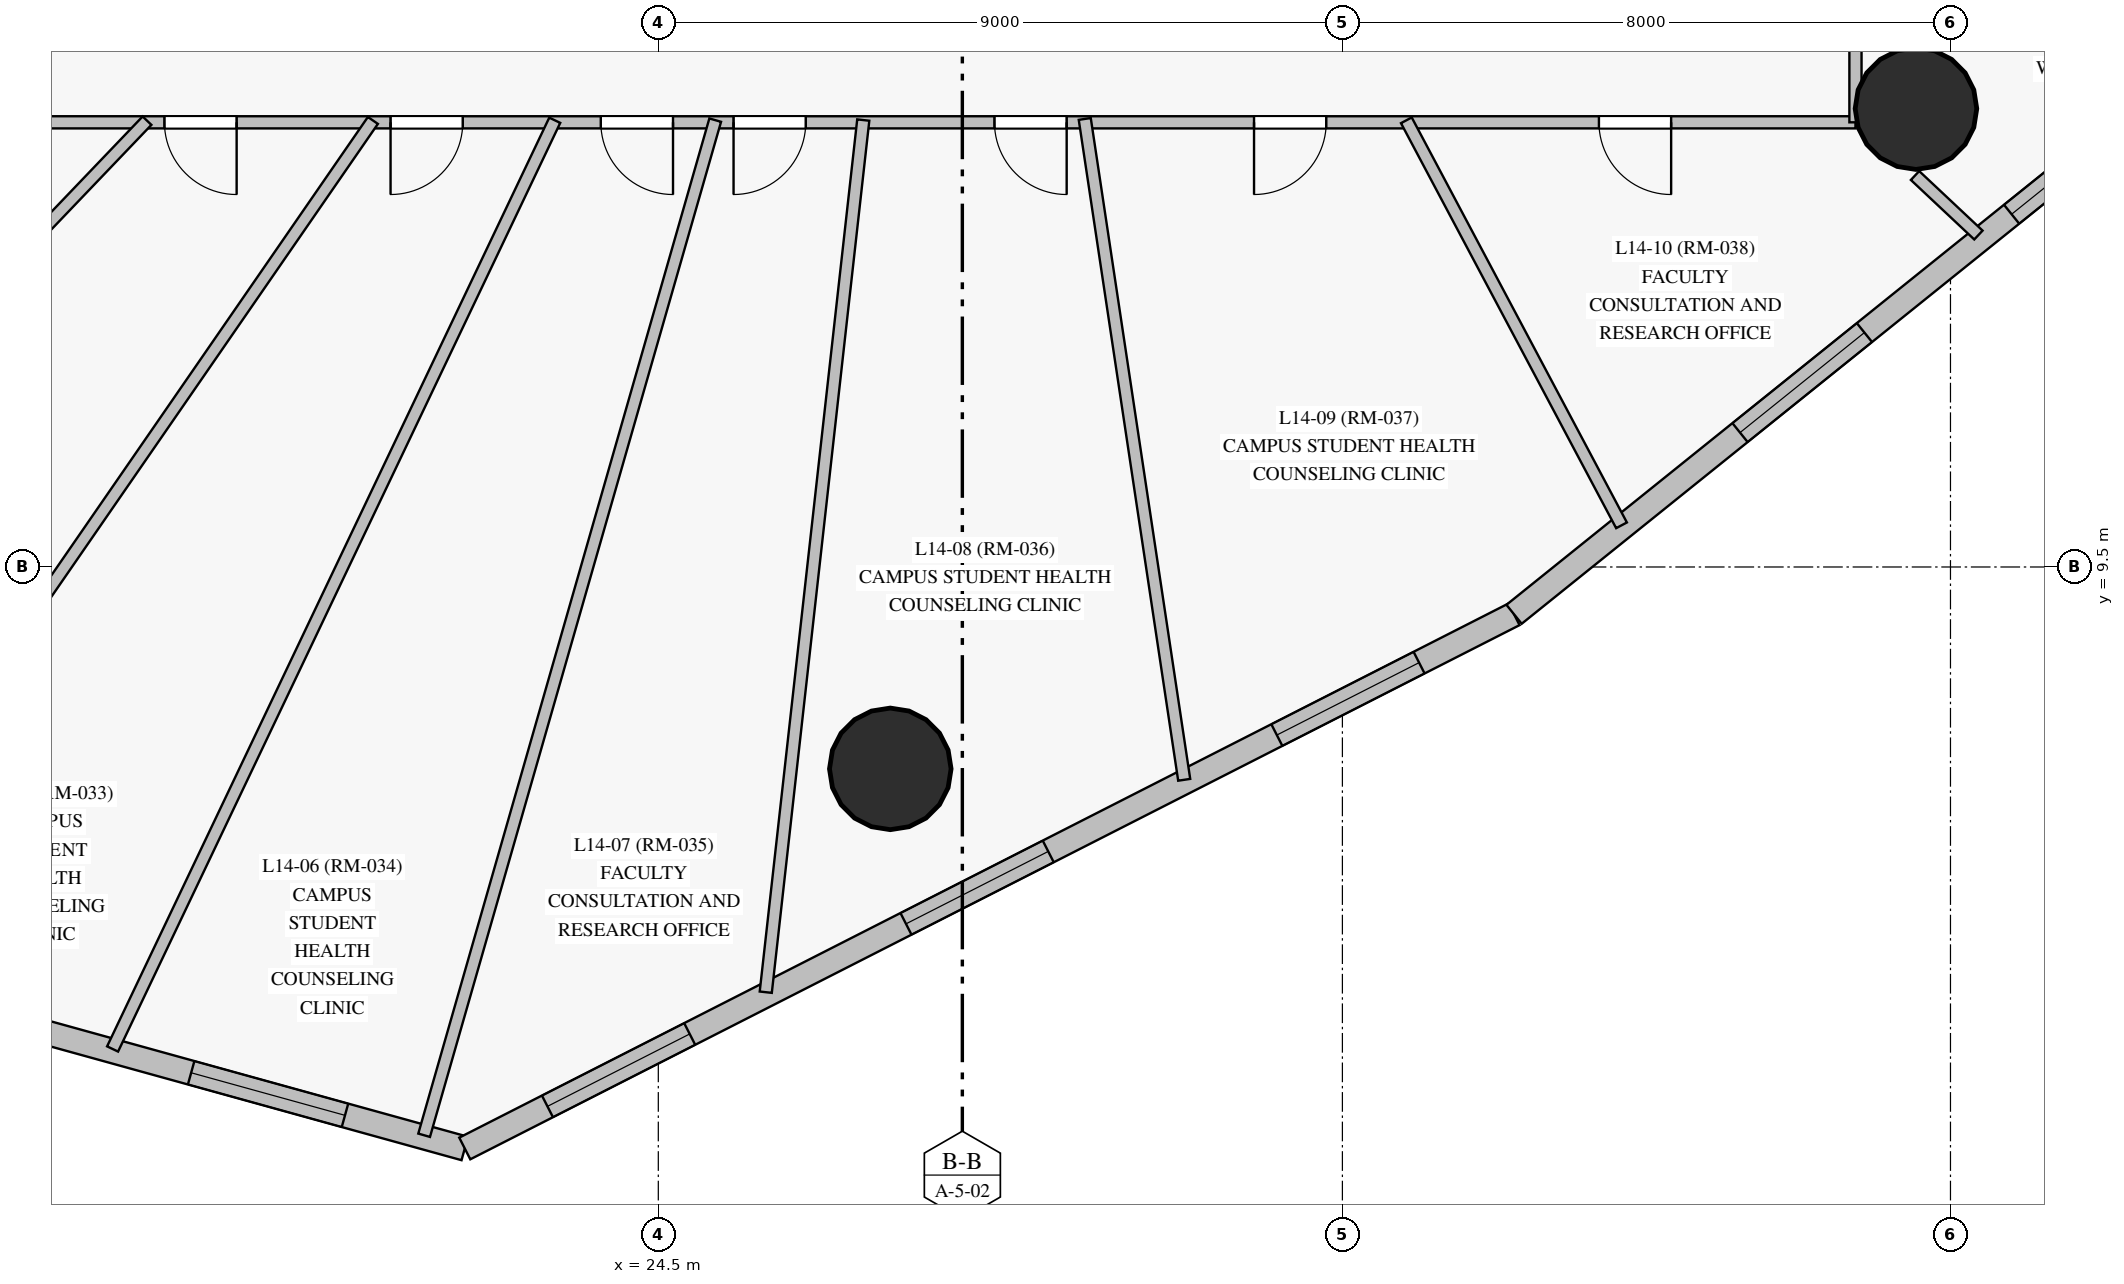
"""IFC4 building model, lengths in metres.
Left out: names, types, materials, properties, quantities, classifications, styles, units other than length and angle.
Written with IfcOpenShell. Run it as: python <this file> out.ifc"""

import sys

from ifc_helpers import new_model, si_unit, direction, frame, frame_2d, origin, origin_with_axes, origin_2d, place, context, subcontext, project, spatial, rectangle, circle, extrude, source, transform, mapped, element, fill, save


model = new_model("IFC4")
c1 = context("Model", 3, precision=1e-05, world=origin(), true_north=direction((0.0, 1.0)))
c2 = subcontext(c1, "Body", "Model", "MODEL_VIEW")
j1 = project(units=[si_unit("LENGTHUNIT", "METRE"), si_unit("PLANEANGLEUNIT", "RADIAN")], contexts=[c1])
p1 = place(None, origin())
s1 = spatial("IfcSite", under=j1, at=p1, CompositionType="ELEMENT")
p2 = place(p1, origin())
s2 = spatial("IfcBuilding", under=s1, at=p2, CompositionType="ELEMENT")
p3 = place(p2, frame((0.0, 0.0, 55.3)))
s3 = spatial("IfcBuildingStorey", under=s2, at=p3, CompositionType="ELEMENT", Elevation=55.3)
m1 = source(origin_with_axes(), c2, "Body", "SweptSolid", [
    extrude(circle(Radius=0.8, at=origin_2d()), origin(), (0.0, 0.0, 1.0), 3.6),
])
for number, where, z_axis, x_axis in (
    (1, (27.552, 6.844, 0.0), (0.0, 0.0, 1.0), (1.0, 0.0, 0.0)),
    (2, (41.046, 15.53, 0.0), (0.0, 0.0, 1.0), (1.0, 0.0, 0.0)),
):
    element("IfcColumn", number, at=place(p3, frame(where, z_axis=z_axis, x_axis=x_axis)), inside=s3, PredefinedType="COLUMN", context=c2, shape_type="MappedRepresentation", body=[
        mapped(m1, transform((0.0, 0.0, 0.0), scale=1.0)),
    ])
p4 = place(p3, frame((12.0, 4.604, 0.0), z_axis=(0.0, 0.0, 1.0), x_axis=(0.963790700111, -0.266659870207, 0.0)))
e3 = element("IfcWall", 3, at=p4, inside=s3, PredefinedType="SOLIDWALL", context=c2, shape_type="SweptSolid", body=[
    extrude(rectangle(XDim=10.328, YDim=0.32, at=frame_2d((5.164, 0.0))), origin(), (0.0, 0.0, 1.0), 3.35),
])
p5 = place(p4, frame((2.29, 0.0, 0.85)))
e4 = element("IfcOpeningElement", 4, at=p5, cuts=e3, PredefinedType="OPENING", context=c2, shape_type="SweptSolid", body=[
    extrude(rectangle(XDim=2.1, YDim=1.95, at=frame_2d((1.05, 0.975))), frame((0.0, 0.17, 0.0), z_axis=(0.0, -1.0, 0.0), x_axis=(1.0, 0.0, 0.0)), (0.0, 0.0, 1.0), 0.34),
])
p6 = place(p4, frame((6.593, 0.0, 0.85)))
e5 = element("IfcOpeningElement", 5, at=p6, cuts=e3, PredefinedType="OPENING", context=c2, shape_type="SweptSolid", body=[
    extrude(rectangle(XDim=2.1, YDim=1.95, at=frame_2d((1.05, 0.975))), frame((0.0, 0.17, 0.0), z_axis=(0.0, -1.0, 0.0), x_axis=(1.0, 0.0, 0.0)), (0.0, 0.0, 1.0), 0.34),
])
p7 = place(p3, frame((21.954, 1.85, 0.0), z_axis=(0.0, 0.0, 1.0), x_axis=(0.891166475467, 0.453676440874, 0.0)))
e6 = element("IfcWall", 6, at=p7, inside=s3, PredefinedType="SOLIDWALL", context=c2, shape_type="SweptSolid", body=[
    extrude(rectangle(XDim=15.49, YDim=0.32, at=frame_2d((7.745, 0.0))), origin(), (0.0, 0.0, 1.0), 3.35),
])
p8 = place(p7, frame((1.22, 0.0, 0.85)))
e7 = element("IfcOpeningElement", 7, at=p8, cuts=e6, PredefinedType="OPENING", context=c2, shape_type="SweptSolid", body=[
    extrude(rectangle(XDim=2.1, YDim=1.95, at=frame_2d((1.05, 0.975))), frame((0.0, 0.17, 0.0), z_axis=(0.0, -1.0, 0.0), x_axis=(1.0, 0.0, 0.0)), (0.0, 0.0, 1.0), 0.34),
])
p9 = place(p7, frame((6.514, 0.0, 0.85)))
e8 = element("IfcOpeningElement", 8, at=p9, cuts=e6, PredefinedType="OPENING", context=c2, shape_type="SweptSolid", body=[
    extrude(rectangle(XDim=2.1, YDim=1.95, at=frame_2d((1.05, 0.975))), frame((0.0, 0.17, 0.0), z_axis=(0.0, -1.0, 0.0), x_axis=(1.0, 0.0, 0.0)), (0.0, 0.0, 1.0), 0.34),
])
p10 = place(p7, frame((11.988, 0.0, 0.85)))
e9 = element("IfcOpeningElement", 9, at=p10, cuts=e6, PredefinedType="OPENING", context=c2, shape_type="SweptSolid", body=[
    extrude(rectangle(XDim=2.1, YDim=1.95, at=frame_2d((1.05, 0.975))), frame((0.0, 0.17, 0.0), z_axis=(0.0, -1.0, 0.0), x_axis=(1.0, 0.0, 0.0)), (0.0, 0.0, 1.0), 0.34),
])
p11 = place(p3, frame((35.758, 8.878, 0.0), z_axis=(0.0, 0.0, 1.0), x_axis=(0.779333999584, 0.62660874323, 0.0)))
e10 = element("IfcWall", 10, at=p11, inside=s3, PredefinedType="SOLIDWALL", context=c2, shape_type="SweptSolid", body=[
    extrude(rectangle(XDim=10.771, YDim=0.32, at=frame_2d((5.385, 0.0))), origin(), (0.0, 0.0, 1.0), 3.35),
])
p12 = place(p11, frame((3.815, 0.0, 0.85)))
e11 = element("IfcOpeningElement", 11, at=p12, cuts=e10, PredefinedType="OPENING", context=c2, shape_type="SweptSolid", body=[
    extrude(rectangle(XDim=2.1, YDim=1.95, at=frame_2d((1.05, 0.975))), frame((0.0, 0.17, 0.0), z_axis=(0.0, -1.0, 0.0), x_axis=(1.0, 0.0, 0.0)), (0.0, 0.0, 1.0), 0.34),
])
p13 = place(p11, frame((8.399, 0.0, 0.85)))
e12 = element("IfcOpeningElement", 12, at=p13, cuts=e10, PredefinedType="OPENING", context=c2, shape_type="SweptSolid", body=[
    extrude(rectangle(XDim=1.8, YDim=1.85, at=frame_2d((0.9, 0.925))), frame((0.0, 0.17, 0.0), z_axis=(0.0, -1.0, 0.0), x_axis=(1.0, 0.0, 0.0)), (0.0, 0.0, 1.0), 0.34),
])
p14 = place(p3, frame((40.25, 15.35, 0.0), z_axis=(0.0, 0.0, 1.0), x_axis=(-1.0, 0.0, 0.0)))
e13 = element("IfcWall", 13, at=p14, inside=s3, PredefinedType="PARTITIONING", context=c2, shape_type="SweptSolid", body=[
    extrude(rectangle(XDim=29.75, YDim=0.16, at=frame_2d((14.875, 0.0))), origin(), (0.0, 0.0, 1.0), 2.7),
])
p15 = place(p14, frame((24.112, 0.0, 0.0)))
e14 = element("IfcOpeningElement", 14, at=p15, cuts=e13, PredefinedType="OPENING", context=c2, shape_type="SweptSolid", body=[
    extrude(rectangle(XDim=0.95, YDim=2.15, at=frame_2d((0.475, 1.075))), frame((0.0, 0.09, 0.0), z_axis=(0.0, -1.0, 0.0), x_axis=(1.0, 0.0, 0.0)), (0.0, 0.0, 1.0), 0.18),
])
p16 = place(p14, frame((21.298, 0.0, 0.0)))
e15 = element("IfcOpeningElement", 15, at=p16, cuts=e13, PredefinedType="OPENING", context=c2, shape_type="SweptSolid", body=[
    extrude(rectangle(XDim=0.95, YDim=2.15, at=frame_2d((0.475, 1.075))), frame((0.0, 0.09, 0.0), z_axis=(0.0, -1.0, 0.0), x_axis=(1.0, 0.0, 0.0)), (0.0, 0.0, 1.0), 0.18),
])
p17 = place(p14, frame((18.323, 0.0, 0.0)))
e16 = element("IfcOpeningElement", 16, at=p17, cuts=e13, PredefinedType="OPENING", context=c2, shape_type="SweptSolid", body=[
    extrude(rectangle(XDim=0.95, YDim=2.15, at=frame_2d((0.475, 1.075))), frame((0.0, 0.09, 0.0), z_axis=(0.0, -1.0, 0.0), x_axis=(1.0, 0.0, 0.0)), (0.0, 0.0, 1.0), 0.18),
])
p18 = place(p14, frame((15.556, 0.0, 0.0)))
e17 = element("IfcOpeningElement", 17, at=p18, cuts=e13, PredefinedType="OPENING", context=c2, shape_type="SweptSolid", body=[
    extrude(rectangle(XDim=0.95, YDim=2.15, at=frame_2d((0.475, 1.075))), frame((0.0, 0.09, 0.0), z_axis=(0.0, -1.0, 0.0), x_axis=(1.0, 0.0, 0.0)), (0.0, 0.0, 1.0), 0.18),
])
p19 = place(p14, frame((13.81, 0.0, 0.0)))
e18 = element("IfcOpeningElement", 18, at=p19, cuts=e13, PredefinedType="OPENING", context=c2, shape_type="SweptSolid", body=[
    extrude(rectangle(XDim=0.95, YDim=2.15, at=frame_2d((0.475, 1.075))), frame((0.0, 0.09, 0.0), z_axis=(0.0, -1.0, 0.0), x_axis=(1.0, 0.0, 0.0)), (0.0, 0.0, 1.0), 0.18),
])
p20 = place(p14, frame((10.377, 0.0, 0.0)))
e19 = element("IfcOpeningElement", 19, at=p20, cuts=e13, PredefinedType="OPENING", context=c2, shape_type="SweptSolid", body=[
    extrude(rectangle(XDim=0.95, YDim=2.15, at=frame_2d((0.475, 1.075))), frame((0.0, 0.09, 0.0), z_axis=(0.0, -1.0, 0.0), x_axis=(1.0, 0.0, 0.0)), (0.0, 0.0, 1.0), 0.18),
])
p21 = place(p14, frame((6.962, 0.0, 0.0)))
e20 = element("IfcOpeningElement", 20, at=p21, cuts=e13, PredefinedType="OPENING", context=c2, shape_type="SweptSolid", body=[
    extrude(rectangle(XDim=0.95, YDim=2.15, at=frame_2d((0.475, 1.075))), frame((0.0, 0.09, 0.0), z_axis=(0.0, -1.0, 0.0), x_axis=(1.0, 0.0, 0.0)), (0.0, 0.0, 1.0), 0.18),
])
p22 = place(p14, frame((2.425, 0.0, 0.0)))
e21 = element("IfcOpeningElement", 21, at=p22, cuts=e13, PredefinedType="OPENING", context=c2, shape_type="SweptSolid", body=[
    extrude(rectangle(XDim=0.95, YDim=2.15, at=frame_2d((0.475, 1.075))), frame((0.0, 0.09, 0.0), z_axis=(0.0, -1.0, 0.0), x_axis=(1.0, 0.0, 0.0)), (0.0, 0.0, 1.0), 0.18),
])
p23 = place(p3, frame((40.25, 37.65, 0.0), z_axis=(0.0, 0.0, 1.0), x_axis=(0.0, -1.0, 0.0)))
e22 = element("IfcWall", 22, at=p23, inside=s3, PredefinedType="PARTITIONING", context=c2, shape_type="SweptSolid", body=[
    extrude(rectangle(XDim=22.3, YDim=0.16, at=frame_2d((11.15, 0.0))), origin(), (0.0, 0.0, 1.0), 2.75),
])
p24 = place(p23, frame((16.25, 0.0, 0.0)))
e23 = element("IfcOpeningElement", 23, at=p24, cuts=e22, PredefinedType="OPENING", context=c2, shape_type="SweptSolid", body=[
    extrude(rectangle(XDim=0.95, YDim=2.15, at=frame_2d((0.475, 1.075))), frame((0.0, 0.09, 0.0), z_axis=(0.0, -1.0, 0.0), x_axis=(1.0, 0.0, 0.0)), (0.0, 0.0, 1.0), 0.18),
])
p25 = place(p23, frame((13.58, 0.0, 0.0)))
e24 = element("IfcOpeningElement", 24, at=p25, cuts=e22, PredefinedType="OPENING", context=c2, shape_type="SweptSolid", body=[
    extrude(rectangle(XDim=0.95, YDim=2.15, at=frame_2d((0.475, 1.075))), frame((0.0, 0.09, 0.0), z_axis=(0.0, -1.0, 0.0), x_axis=(1.0, 0.0, 0.0)), (0.0, 0.0, 1.0), 0.18),
])
p26 = place(p23, frame((10.151, 0.0, 0.0)))
e25 = element("IfcOpeningElement", 25, at=p26, cuts=e22, PredefinedType="OPENING", context=c2, shape_type="SweptSolid", body=[
    extrude(rectangle(XDim=0.86, YDim=2.1, at=frame_2d((0.43, 1.05))), frame((0.0, 0.09, 0.0), z_axis=(0.0, -1.0, 0.0), x_axis=(1.0, 0.0, 0.0)), (0.0, 0.0, 1.0), 0.18),
])
p27 = place(p23, frame((8.711, 0.0, 0.0)))
e26 = element("IfcOpeningElement", 26, at=p27, cuts=e22, PredefinedType="OPENING", context=c2, shape_type="SweptSolid", body=[
    extrude(rectangle(XDim=0.86, YDim=2.1, at=frame_2d((0.43, 1.05))), frame((0.0, 0.09, 0.0), z_axis=(0.0, -1.0, 0.0), x_axis=(1.0, 0.0, 0.0)), (0.0, 0.0, 1.0), 0.18),
])
p28 = place(p23, frame((3.39, 0.0, 0.0)))
e27 = element("IfcOpeningElement", 27, at=p28, cuts=e22, PredefinedType="OPENING", context=c2, shape_type="SweptSolid", body=[
    extrude(rectangle(XDim=0.95, YDim=2.15, at=frame_2d((0.475, 1.075))), frame((0.0, 0.09, 0.0), z_axis=(0.0, -1.0, 0.0), x_axis=(1.0, 0.0, 0.0)), (0.0, 0.0, 1.0), 0.18),
])
p29 = place(p23, frame((0.759, 0.0, 0.0)))
e28 = element("IfcOpeningElement", 28, at=p29, cuts=e22, PredefinedType="OPENING", context=c2, shape_type="SweptSolid", body=[
    extrude(rectangle(XDim=0.86, YDim=2.1, at=frame_2d((0.43, 1.05))), frame((0.0, 0.09, 0.0), z_axis=(0.0, -1.0, 0.0), x_axis=(1.0, 0.0, 0.0)), (0.0, 0.0, 1.0), 0.18),
])
p30 = place(p23, frame((15.09, 0.0, 0.0)))
e29 = element("IfcOpeningElement", 29, at=p30, cuts=e22, PredefinedType="OPENING", context=c2, shape_type="SweptSolid", body=[
    extrude(rectangle(XDim=0.95, YDim=2.15, at=frame_2d((0.475, 1.075))), frame((0.0, 0.09, 0.0), z_axis=(0.0, -1.0, 0.0), x_axis=(1.0, 0.0, 0.0)), (0.0, 0.0, 1.0), 0.18),
])
p31 = place(p23, frame((17.345, 0.0, 0.0)))
e30 = element("IfcOpeningElement", 30, at=p31, cuts=e22, PredefinedType="OPENING", context=c2, shape_type="SweptSolid", body=[
    extrude(rectangle(XDim=0.95, YDim=2.15, at=frame_2d((0.475, 1.075))), frame((0.0, 0.09, 0.0), z_axis=(0.0, -1.0, 0.0), x_axis=(1.0, 0.0, 0.0)), (0.0, 0.0, 1.0), 0.18),
])
p32 = place(p23, frame((18.437, 0.0, 0.0)))
e31 = element("IfcOpeningElement", 31, at=p32, cuts=e22, PredefinedType="OPENING", context=c2, shape_type="SweptSolid", body=[
    extrude(rectangle(XDim=0.95, YDim=2.15, at=frame_2d((0.475, 1.075))), frame((0.0, 0.09, 0.0), z_axis=(0.0, -1.0, 0.0), x_axis=(1.0, 0.0, 0.0)), (0.0, 0.0, 1.0), 0.18),
])
p33 = place(p23, frame((6.529, 0.0, 0.0)))
e32 = element("IfcOpeningElement", 32, at=p33, cuts=e22, PredefinedType="OPENING", context=c2, shape_type="SweptSolid", body=[
    extrude(rectangle(XDim=0.86, YDim=2.04, at=frame_2d((0.43, 1.02))), frame((0.0, 0.09, 0.0), z_axis=(0.0, -1.0, 0.0), x_axis=(1.0, 0.0, 0.0)), (0.0, 0.0, 1.0), 0.18),
])
p34 = place(p3, frame((25.249, 15.379, 0.0), z_axis=(0.0, 0.0, 1.0), x_axis=(-0.275628488565, -0.961264238538, 0.0)))
e33 = element("IfcWall", 33, at=p34, inside=s3, PredefinedType="PARTITIONING", context=c2, shape_type="SweptSolid", body=[
    extrude(rectangle(XDim=13.893, YDim=0.16, at=frame_2d((6.947, 0.0))), origin(), (0.0, 0.0, 1.0), 3.35),
])
p35 = place(p3, frame((23.138, 15.377, 0.0), z_axis=(0.0, 0.0, 1.0), x_axis=(-0.429883158036, -0.902884527743, 0.0)))
e34 = element("IfcWall", 34, at=p35, inside=s3, PredefinedType="PARTITIONING", context=c2, shape_type="SweptSolid", body=[
    extrude(rectangle(XDim=13.532, YDim=0.16, at=frame_2d((6.766, 0.0))), origin(), (0.0, 0.0, 1.0), 3.35),
])
p36 = place(p3, frame((27.197, 15.38, 0.0), z_axis=(0.0, 0.0, 1.0), x_axis=(-0.111102248763, -0.993808980801, 0.0)))
e35 = element("IfcWall", 35, at=p36, inside=s3, PredefinedType="PARTITIONING", context=c2, shape_type="SweptSolid", body=[
    extrude(rectangle(XDim=11.545, YDim=0.16, at=frame_2d((5.773, 0.0))), origin(), (0.0, 0.0, 1.0), 2.7),
])
p37 = place(p3, frame((17.773, 15.372, 0.0), z_axis=(0.0, 0.0, 1.0), x_axis=(-0.691191745844, -0.722671412523, 0.0)))
e36 = element("IfcWall", 36, at=p37, inside=s3, PredefinedType="PARTITIONING", context=c2, shape_type="SweptSolid", body=[
    extrude(rectangle(XDim=10.943, YDim=0.16, at=frame_2d((5.472, 0.0))), origin(), (0.0, 0.0, 1.0), 2.7),
])
p38 = place(p3, frame((30.111, 15.395, 0.0), z_axis=(0.0, 0.0, 1.0), x_axis=(0.148780379467, -0.988870263829, 0.0)))
e37 = element("IfcWall", 37, at=p38, inside=s3, PredefinedType="PARTITIONING", context=c2, shape_type="SweptSolid", body=[
    extrude(rectangle(XDim=8.792, YDim=0.16, at=frame_2d((4.396, 0.0))), origin(), (0.0, 0.0, 1.0), 3.35),
])
p39 = place(p3, frame((20.745, 15.375, 0.0), z_axis=(0.0, 0.0, 1.0), x_axis=(-0.568218054663, -0.822878023984, 0.0)))
e38 = element("IfcWall", 38, at=p39, inside=s3, PredefinedType="PARTITIONING", context=c2, shape_type="SweptSolid", body=[
    extrude(rectangle(XDim=7.631, YDim=0.16, at=frame_2d((3.815, 0.0))), origin(), (0.0, 0.0, 1.0), 2.7),
])
p40 = place(p3, frame((34.342, 15.376, 0.0), z_axis=(0.0, 0.0, 1.0), x_axis=(0.469170018206, -0.883107860919, 0.0)))
e39 = element("IfcWall", 39, at=p40, inside=s3, PredefinedType="PARTITIONING", context=c2, shape_type="SweptSolid", body=[
    extrude(rectangle(XDim=6.034, YDim=0.16, at=frame_2d((3.017, 0.0))), origin(), (0.0, 0.0, 1.0), 3.35),
])
p41 = place(p3, frame((41.034, 14.65, 0.0), z_axis=(0.0, 0.0, 1.0), x_axis=(0.729064336352, -0.68444517199, 0.0)))
e40 = element("IfcWall", 40, at=p41, inside=s3, PredefinedType="PARTITIONING", context=c2, shape_type="SweptSolid", body=[
    extrude(rectangle(XDim=1.144, YDim=0.16, at=frame_2d((0.572, 0.0))), origin(), (0.0, 0.0, 1.0), 3.35),
])
m2 = source(origin_with_axes(), c2, "Body", "SweptSolid", [
    extrude(rectangle(XDim=2.1, YDim=1.95, at=frame_2d((1.05, 0.975))), frame((0.0, 0.03, 0.0), z_axis=(0.0, -1.0, 0.0), x_axis=(1.0, 0.0, 0.0)), (0.0, 0.0, 1.0), 0.06),
])
p42 = place(p6, origin())
e41 = element("IfcWindow", 41, at=p42, inside=s3, PartitioningType="SINGLE_PANEL", PredefinedType="WINDOW", context=c2, shape_type="MappedRepresentation", body=[
    mapped(m2, transform((0.0, 0.0, 0.0), scale=1.0)),
])
fill(e5, e41)
p43 = place(p8, origin())
e42 = element("IfcWindow", 42, at=p43, inside=s3, PartitioningType="SINGLE_PANEL", PredefinedType="WINDOW", context=c2, shape_type="MappedRepresentation", body=[
    mapped(m2, transform((0.0, 0.0, 0.0), scale=1.0)),
])
fill(e7, e42)
p44 = place(p9, origin())
e43 = element("IfcWindow", 43, at=p44, inside=s3, PartitioningType="SINGLE_PANEL", PredefinedType="WINDOW", context=c2, shape_type="MappedRepresentation", body=[
    mapped(m2, transform((0.0, 0.0, 0.0), scale=1.0)),
])
fill(e8, e43)
p45 = place(p10, origin())
e44 = element("IfcWindow", 44, at=p45, inside=s3, PartitioningType="SINGLE_PANEL", PredefinedType="WINDOW", context=c2, shape_type="MappedRepresentation", body=[
    mapped(m2, transform((0.0, 0.0, 0.0), scale=1.0)),
])
fill(e9, e44)
p46 = place(p12, origin())
e45 = element("IfcWindow", 45, at=p46, inside=s3, PartitioningType="SINGLE_PANEL", PredefinedType="WINDOW", context=c2, shape_type="MappedRepresentation", body=[
    mapped(m2, transform((0.0, 0.0, 0.0), scale=1.0)),
])
fill(e11, e45)
m3 = source(origin_with_axes(), c2, "Body", "SweptSolid", [
    extrude(rectangle(XDim=1.8, YDim=1.85, at=frame_2d((0.9, 0.925))), frame((0.0, 0.03, 0.0), z_axis=(0.0, -1.0, 0.0), x_axis=(1.0, 0.0, 0.0)), (0.0, 0.0, 1.0), 0.06),
])
p47 = place(p13, origin())
e46 = element("IfcWindow", 46, at=p47, inside=s3, PartitioningType="SINGLE_PANEL", PredefinedType="WINDOW", context=c2, shape_type="MappedRepresentation", body=[
    mapped(m3, transform((0.0, 0.0, 0.0), scale=1.0)),
])
fill(e12, e46)
m4 = source(origin_with_axes(), c2, "Body", "SweptSolid", [
    extrude(rectangle(XDim=0.95, YDim=2.15, at=frame_2d((0.475, 1.075))), frame((0.0, 0.025, 0.0), z_axis=(0.0, -1.0, 0.0), x_axis=(1.0, 0.0, 0.0)), (0.0, 0.0, 1.0), 0.05),
])
p48 = place(p16, origin())
e47 = element("IfcDoor", 47, at=p48, inside=s3, OperationType="SINGLE_SWING_LEFT", PredefinedType="DOOR", context=c2, shape_type="MappedRepresentation", body=[
    mapped(m4, transform((0.0, 0.0, 0.0), scale=1.0)),
])
fill(e15, e47)
p49 = place(p17, origin())
e48 = element("IfcDoor", 48, at=p49, inside=s3, OperationType="SINGLE_SWING_RIGHT", PredefinedType="DOOR", context=c2, shape_type="MappedRepresentation", body=[
    mapped(m4, transform((0.0, 0.0, 0.0), scale=1.0)),
])
fill(e16, e48)
p50 = place(p18, origin())
e49 = element("IfcDoor", 49, at=p50, inside=s3, OperationType="SINGLE_SWING_LEFT", PredefinedType="DOOR", context=c2, shape_type="MappedRepresentation", body=[
    mapped(m4, transform((0.0, 0.0, 0.0), scale=1.0)),
])
fill(e17, e49)
p51 = place(p19, origin())
e50 = element("IfcDoor", 50, at=p51, inside=s3, OperationType="SINGLE_SWING_RIGHT", PredefinedType="DOOR", context=c2, shape_type="MappedRepresentation", body=[
    mapped(m4, transform((0.0, 0.0, 0.0), scale=1.0)),
])
fill(e18, e50)
p52 = place(p20, origin())
e51 = element("IfcDoor", 51, at=p52, inside=s3, OperationType="SINGLE_SWING_LEFT", PredefinedType="DOOR", context=c2, shape_type="MappedRepresentation", body=[
    mapped(m4, transform((0.0, 0.0, 0.0), scale=1.0)),
])
fill(e19, e51)
p53 = place(p21, origin())
e52 = element("IfcDoor", 52, at=p53, inside=s3, OperationType="SINGLE_SWING_RIGHT", PredefinedType="DOOR", context=c2, shape_type="MappedRepresentation", body=[
    mapped(m4, transform((0.0, 0.0, 0.0), scale=1.0)),
])
fill(e20, e52)
p54 = place(p22, origin())
e53 = element("IfcDoor", 53, at=p54, inside=s3, OperationType="SINGLE_SWING_LEFT", PredefinedType="DOOR", context=c2, shape_type="MappedRepresentation", body=[
    mapped(m4, transform((0.0, 0.0, 0.0), scale=1.0)),
])
fill(e21, e53)
save(model, sys.argv[1])
